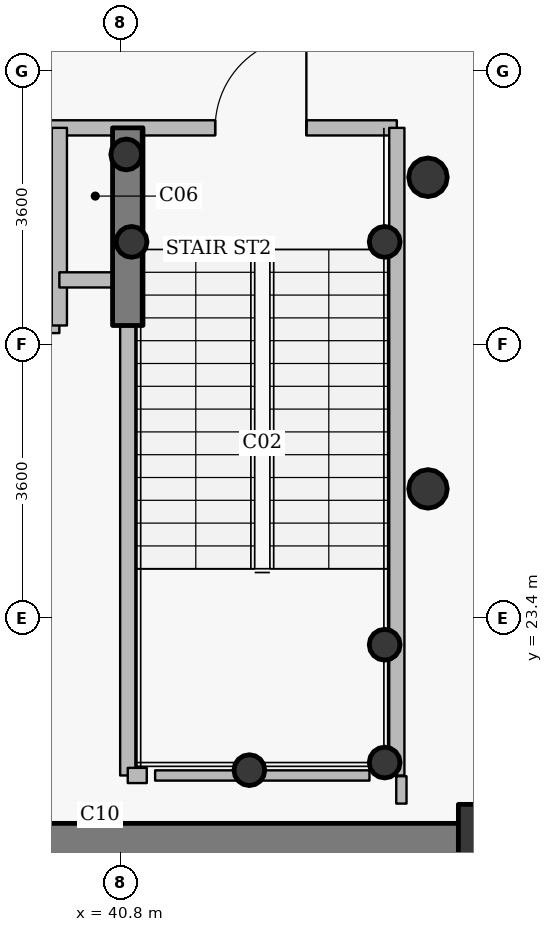
"""IFC4 building model, lengths in metres.
Left out: names, types, materials, properties, quantities, classifications, styles, units other than length and angle.
Written with IfcOpenShell. Run it as: python <this file> out.ifc"""

import sys

from ifc_helpers import new_model, si_unit, direction, frame, frame_2d, origin, origin_2d, place, context, subcontext, project, spatial, rectangle, hollow_circle, extrude, source, transform, mapped, element, fill, save


model = new_model("IFC4")
c1 = context("Model", 3, precision=1e-05, world=origin(), true_north=direction((0.0, 1.0)))
c2 = subcontext(c1, "Body", "Model", "MODEL_VIEW")
j1 = project(units=[si_unit("LENGTHUNIT", "METRE"), si_unit("PLANEANGLEUNIT", "RADIAN")], contexts=[c1])
p1 = place(None, origin())
s1 = spatial("IfcSite", under=j1, at=p1, CompositionType="ELEMENT")
p2 = place(p1, origin())
s2 = spatial("IfcBuilding", under=s1, at=p2, CompositionType="ELEMENT")
p3 = place(p2, frame((0.0, 0.0, -9.0)))
s3 = spatial("IfcBuildingStorey", under=s2, at=p3, CompositionType="ELEMENT", Elevation=-9.0)
p4 = place(p3, frame((45.95, 20.25, 0.0), z_axis=(0.0, 0.0, 1.0), x_axis=(1.0, 0.0, 0.0)))
e1 = element("IfcColumn", 1, at=p4, inside=s3, PredefinedType="COLUMN", context=c2, shape_type="SweptSolid", body=[
    extrude(rectangle(XDim=1.4, YDim=1.4, at=origin_2d()), origin(), (0.0, 0.0, 1.0), 4.5),
])
for number, where, z_axis, x_axis in (
    (2, (44.28, 21.5, 0.0), (0.0, 0.0, 1.0), (1.0, 0.0, 0.0)),
    (3, (44.28, 23.05, 0.0), (0.0, 0.0, 1.0), (1.0, 0.0, 0.0)),
    (4, (42.5, 21.4, 0.0), (0.0, 0.0, 1.0), (1.0, 0.0, 0.0)),
    (5, (40.95, 28.35, 0.0), (0.0, 0.0, 1.0), (1.0, 0.0, 0.0)),
    (6, (44.28, 28.35, 0.0), (0.0, 0.0, 1.0), (1.0, 0.0, 0.0)),
    (7, (40.88, 29.5, 0.0), (0.0, 0.0, 1.0), (1.0, 0.0, 0.0)),
):
    element("IfcColumn", number, at=place(p3, frame(where, z_axis=z_axis, x_axis=x_axis)), inside=s3, PredefinedType="COLUMN", context=c2, shape_type="SweptSolid", body=[
        extrude(hollow_circle(Radius=0.203, WallThickness=0.016, at=origin_2d()), origin(), (0.0, 0.0, 1.0), 4.5),
    ])
p5 = place(p3, frame((45.25, 20.25, 0.0), z_axis=(0.0, 0.0, 1.0), x_axis=(-1.0, 0.0, 0.0)))
e8 = element("IfcWall", 8, at=p5, inside=s3, PredefinedType="SHEAR", context=c2, shape_type="SweptSolid", body=[
    extrude(rectangle(XDim=18.5, YDim=0.9, at=frame_2d((9.25, 0.0))), origin(), (0.0, 0.0, 1.0), 3.65),
])
p6 = place(p5, frame((10.0, 0.0, 0.0)))
e9 = element("IfcOpeningElement", 9, at=p6, cuts=e8, PredefinedType="OPENING", context=c2, shape_type="SweptSolid", body=[
    extrude(rectangle(XDim=1.15, YDim=2.15, at=origin_2d()), frame((0.575, 0.46, 1.075), z_axis=(0.0, -1.0, 0.0), x_axis=(1.0, 0.0, 0.0)), (0.0, 0.0, 1.0), 0.92),
])
p7 = place(p3, frame((40.9, 27.25, 0.0), z_axis=(0.0, 0.0, 1.0), x_axis=(0.0, 1.0, 0.0)))
e10 = element("IfcWall", 10, at=p7, inside=s3, PredefinedType="SHEAR", context=c2, shape_type="SweptSolid", body=[
    extrude(rectangle(XDim=2.6, YDim=0.4, at=frame_2d((1.3, 0.0))), origin(), (0.0, 0.0, 1.0), 3.8),
])
for number, where, z_axis, x_axis in (
    (11, (44.85, 25.1, 0.0), (0.0, 0.0, 1.0), (1.0, 0.0, 0.0)),
    (12, (44.85, 29.2, 0.0), (0.0, 0.0, 1.0), (1.0, 0.0, 0.0)),
):
    element("IfcColumn", number, at=place(p3, frame(where, z_axis=z_axis, x_axis=x_axis)), inside=s3, PredefinedType="COLUMN", context=c2, shape_type="SweptSolid", body=[
        extrude(hollow_circle(Radius=0.254, WallThickness=0.02, at=origin_2d()), origin(), (0.0, 0.0, 1.0), 4.5),
    ])
p8 = place(p3, frame((35.95, 29.85, 0.0), z_axis=(0.0, 0.0, 1.0), x_axis=(1.0, 0.0, 0.0)))
e13 = element("IfcWall", 13, at=p8, inside=s3, PredefinedType="PARTITIONING", context=c2, shape_type="SweptSolid", body=[
    extrude(rectangle(XDim=8.49, YDim=0.2, at=frame_2d((4.245, 0.0))), origin(), (0.0, 0.0, 1.0), 3.785),
])
p9 = place(p8, frame((6.1, 0.0, 0.0)))
e14 = element("IfcOpeningElement", 14, at=p9, cuts=e13, PredefinedType="OPENING", context=c2, shape_type="SweptSolid", body=[
    extrude(rectangle(XDim=1.2, YDim=2.15, at=origin_2d()), frame((0.6, 0.11, 1.075), z_axis=(0.0, -1.0, 0.0), x_axis=(1.0, 0.0, 0.0)), (0.0, 0.0, 1.0), 0.22),
])
p10 = place(p8, frame((0.37, 0.0, 0.0)))
e15 = element("IfcOpeningElement", 15, at=p10, cuts=e13, PredefinedType="OPENING", context=c2, shape_type="SweptSolid", body=[
    extrude(rectangle(XDim=1.15, YDim=2.15, at=origin_2d()), frame((0.575, 0.11, 1.075), z_axis=(0.0, -1.0, 0.0), x_axis=(1.0, 0.0, 0.0)), (0.0, 0.0, 1.0), 0.22),
])
p11 = place(p8, frame((2.425, 0.0, 0.0)))
e16 = element("IfcOpeningElement", 16, at=p11, cuts=e13, PredefinedType="OPENING", context=c2, shape_type="SweptSolid", body=[
    extrude(rectangle(XDim=1.05, YDim=2.15, at=origin_2d()), frame((0.525, 0.11, 1.075), z_axis=(0.0, -1.0, 0.0), x_axis=(1.0, 0.0, 0.0)), (0.0, 0.0, 1.0), 0.22),
])
p12 = place(p3, frame((39.8, 27.25, 0.0), z_axis=(0.0, 0.0, 1.0), x_axis=(1.0, 0.0, 0.0)))
e17 = element("IfcWall", 17, at=p12, inside=s3, PredefinedType="PARTITIONING", context=c2, shape_type="SweptSolid", body=[
    extrude(rectangle(XDim=0.2, YDim=0.2, at=frame_2d((0.1, 0.0))), origin(), (0.0, 0.0, 1.0), 4.2),
])
p13 = place(p3, frame((40.0, 27.25, 0.0), z_axis=(0.0, 0.0, 1.0), x_axis=(0.0, 1.0, 0.0)))
e18 = element("IfcWall", 18, at=p13, inside=s3, PredefinedType="PARTITIONING", context=c2, shape_type="SweptSolid", body=[
    extrude(rectangle(XDim=2.6, YDim=0.2, at=frame_2d((1.3, 0.0))), origin(), (0.0, 0.0, 1.0), 4.2),
])
p14 = place(p3, frame((40.0, 27.85, 0.0), z_axis=(0.0, 0.0, 1.0), x_axis=(1.0, 0.0, 0.0)))
e19 = element("IfcWall", 19, at=p14, inside=s3, PredefinedType="PARTITIONING", context=c2, shape_type="SweptSolid", body=[
    extrude(rectangle(XDim=0.9, YDim=0.2, at=frame_2d((0.45, 0.0))), origin(), (0.0, 0.0, 1.0), 4.2),
])
p15 = place(p3, frame((40.9, 21.33, 0.0), z_axis=(0.0, 0.0, 1.0), x_axis=(0.0, 1.0, 0.0)))
e20 = element("IfcWall", 20, at=p15, inside=s3, PredefinedType="PARTITIONING", context=c2, shape_type="SweptSolid", body=[
    extrude(rectangle(XDim=5.91, YDim=0.2, at=frame_2d((2.955, 0.0))), origin(), (0.0, 0.0, 1.0), 3.735),
])
p16 = place(p3, frame((40.9, 21.33, 0.0), z_axis=(0.0, 0.0, 1.0), x_axis=(1.0, 0.0, 0.0)))
e21 = element("IfcWall", 21, at=p16, inside=s3, PredefinedType="PARTITIONING", context=c2, shape_type="SweptSolid", body=[
    extrude(rectangle(XDim=0.25, YDim=0.2, at=frame_2d((0.125, 0.0))), origin(), (0.0, 0.0, 1.0), 3.735),
])
p17 = place(p3, frame((44.44, 21.33, 0.0), z_axis=(0.0, 0.0, 1.0), x_axis=(0.0, 1.0, 0.0)))
e22 = element("IfcWall", 22, at=p17, inside=s3, PredefinedType="PARTITIONING", context=c2, shape_type="SweptSolid", body=[
    extrude(rectangle(XDim=8.52, YDim=0.2, at=frame_2d((4.26, 0.0))), origin(), (0.0, 0.0, 1.0), 4.2),
])
p18 = place(p3, frame((44.08, 21.33, 0.0), z_axis=(0.0, 0.0, 1.0), x_axis=(-1.0, 0.0, 0.0)))
e23 = element("IfcWall", 23, at=p18, inside=s3, PredefinedType="PARTITIONING", context=c2, shape_type="SweptSolid", body=[
    extrude(rectangle(XDim=2.82, YDim=0.135, at=frame_2d((1.41, 0.0))), origin(), (0.0, 0.0, 1.0), 3.735),
])
p19 = place(p3, frame((44.5, 20.96, 0.0), z_axis=(0.0, 0.0, 1.0), x_axis=(0.0, 1.0, 0.0)))
e24 = element("IfcWall", 24, at=p19, inside=s3, PredefinedType="PARTITIONING", context=c2, shape_type="SweptSolid", body=[
    extrude(rectangle(XDim=0.36, YDim=0.135, at=frame_2d((0.18, 0.0))), origin(), (0.0, 0.0, 1.0), 4.2),
])
m1 = source(origin(), c2, "Body", "SweptSolid", [
    extrude(rectangle(XDim=1.2, YDim=2.15, at=origin_2d()), frame((0.6, 0.025, 1.075), z_axis=(0.0, -1.0, 0.0), x_axis=(1.0, 0.0, 0.0)), (0.0, 0.0, 1.0), 0.05),
])
p20 = place(p9, origin())
e25 = element("IfcDoor", 25, at=p20, inside=s3, OperationType="SINGLE_SWING_RIGHT", PredefinedType="DOOR", context=c2, shape_type="MappedRepresentation", body=[
    mapped(m1, transform((0.0, 0.0, 0.0), x_axis=(1.0, 0.0, 0.0), y_axis=(0.0, 1.0, 0.0), z_axis=(0.0, 0.0, 1.0), scale=1.0)),
])
fill(e14, e25)
save(model, sys.argv[1])
